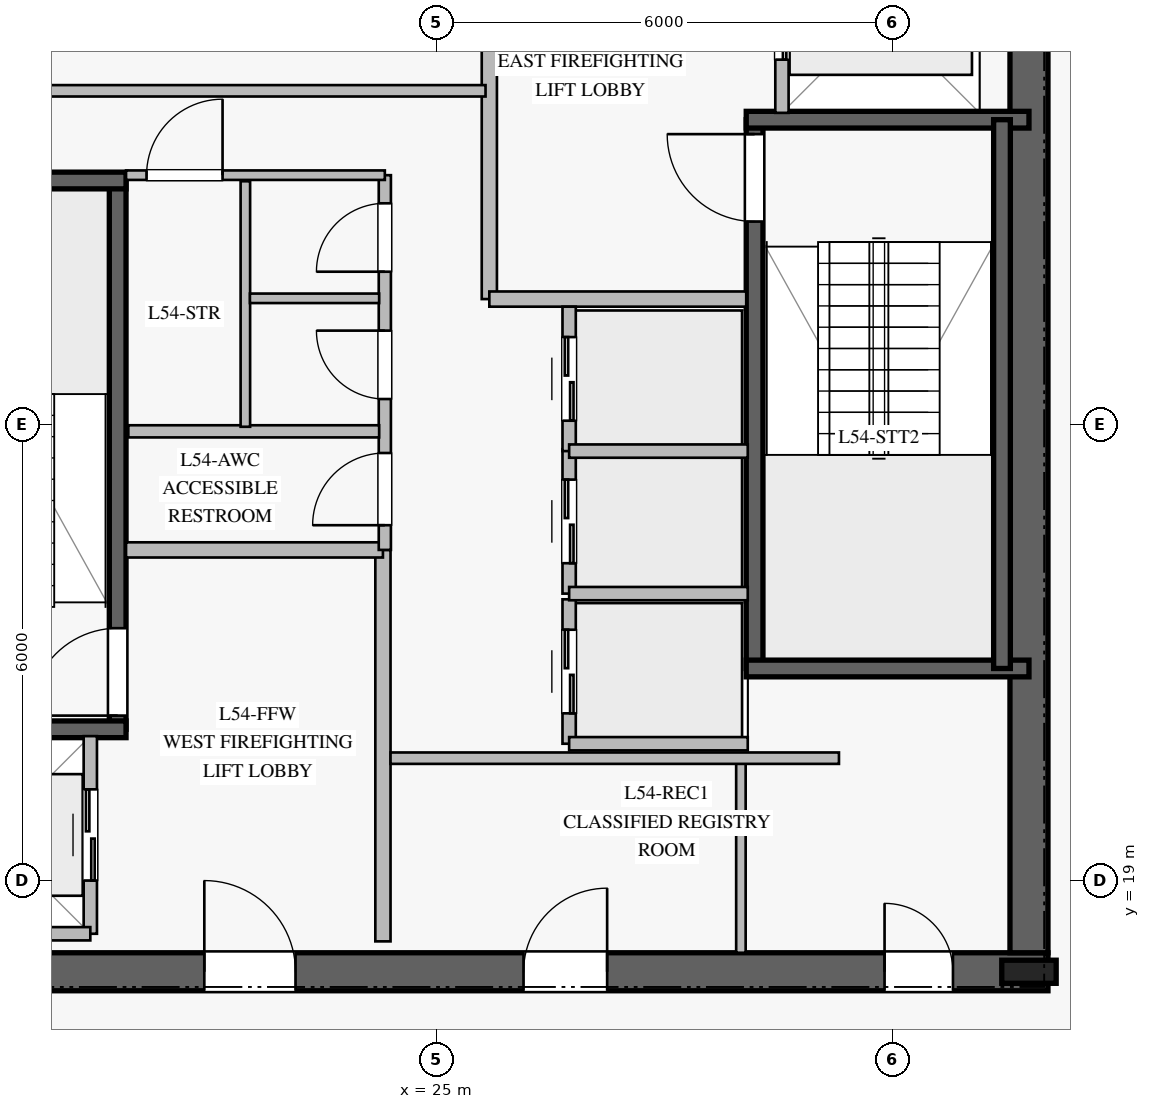
"""IFC4 building model, lengths in metres.
Left out: names, types, materials, properties, quantities, classifications, styles, units other than length and angle.
Written with IfcOpenShell. Run it as: python <this file> out.ifc"""

import sys

from ifc_helpers import new_model, si_unit, direction, frame, frame_2d, origin, origin_2d, place, context, subcontext, project, spatial, rectangle, i_section, extrude, element, fill, save


model = new_model("IFC4")
c1 = context("Model", 3, precision=1e-05, world=origin(), true_north=direction((0.0, 1.0)))
c2 = subcontext(c1, "Body", "Model", "MODEL_VIEW")
j1 = project(units=[si_unit("LENGTHUNIT", "METRE"), si_unit("PLANEANGLEUNIT", "RADIAN")], contexts=[c1])
p1 = place(None, origin())
s1 = spatial("IfcSite", under=j1, at=p1, CompositionType="ELEMENT")
p2 = place(p1, origin())
s2 = spatial("IfcBuilding", under=s1, at=p2, CompositionType="ELEMENT")
p3 = place(p2, frame((0.0, 0.0, 224.8)))
s3 = spatial("IfcBuildingStorey", under=s2, at=p3, CompositionType="ELEMENT", Elevation=224.8)
p4 = place(p3, frame((16.95, 17.8, 0.0), z_axis=(0.0, 0.0, 1.0), x_axis=(1.0, 0.0, 0.0)))
e1 = element("IfcWall", 1, at=p4, inside=s3, PredefinedType="SHEAR", context=c2, shape_type="SweptSolid", body=[
    extrude(rectangle(XDim=16.1, YDim=0.5, at=frame_2d((8.05, 0.0))), origin(), (0.0, 0.0, 1.0), 3.78),
])
p5 = place(p4, frame((5.0, 0.0, 0.0)))
e2 = element("IfcOpeningElement", 2, at=p5, cuts=e1, PredefinedType="OPENING", context=c2, shape_type="SweptSolid", body=[
    extrude(rectangle(XDim=1.2, YDim=2.25, at=frame_2d((0.6, 1.125))), frame((0.0, 0.26, 0.0), z_axis=(0.0, -1.0, 0.0), x_axis=(1.0, 0.0, 0.0)), (0.0, 0.0, 1.0), 0.52),
])
p6 = place(p4, frame((13.95, 0.0, 0.0)))
e3 = element("IfcOpeningElement", 3, at=p6, cuts=e1, PredefinedType="OPENING", context=c2, shape_type="SweptSolid", body=[
    extrude(rectangle(XDim=0.9, YDim=2.1, at=frame_2d((0.45, 1.05))), frame((0.0, 0.26, 0.0), z_axis=(0.0, -1.0, 0.0), x_axis=(1.0, 0.0, 0.0)), (0.0, 0.0, 1.0), 0.52),
])
p7 = place(p4, frame((9.2, 0.0, 0.0)))
e4 = element("IfcOpeningElement", 4, at=p7, cuts=e1, PredefinedType="OPENING", context=c2, shape_type="SweptSolid", body=[
    extrude(rectangle(XDim=1.1, YDim=2.2, at=frame_2d((0.55, 1.1))), frame((0.0, 0.26, 0.0), z_axis=(0.0, -1.0, 0.0), x_axis=(1.0, 0.0, 0.0)), (0.0, 0.0, 1.0), 0.52),
])
p8 = place(p3, frame((32.8, 18.05, 0.0), z_axis=(0.0, 0.0, 1.0), x_axis=(0.0, 1.0, 0.0)))
e5 = element("IfcWall", 5, at=p8, inside=s3, PredefinedType="SHEAR", context=c2, shape_type="SweptSolid", body=[
    extrude(rectangle(XDim=13.9, YDim=0.5, at=frame_2d((6.95, 0.0))), origin(), (0.0, 0.0, 1.0), 3.78),
])
p9 = place(p3, frame((32.8, 17.8, 0.0), z_axis=(0.0, 0.0, 1.0), x_axis=(1.0, 0.0, 0.0)))
e6 = element("IfcColumn", 6, at=p9, inside=s3, PredefinedType="COLUMN", context=c2, shape_type="SweptSolid", body=[
    extrude(i_section(OverallWidth=0.304, OverallDepth=0.716, WebThickness=0.021, FlangeThickness=0.04, at=origin_2d()), origin(), (0.0, 0.0, 1.0), 4.0),
])
p10 = place(p3, frame((20.81, 20.99, 0.0), z_axis=(0.0, 0.0, 1.0), x_axis=(0.0, 1.0, 0.0)))
e7 = element("IfcWall", 7, at=p10, inside=s3, PredefinedType="SOLIDWALL", context=c2, shape_type="SweptSolid", body=[
    extrude(rectangle(XDim=7.22, YDim=0.22, at=frame_2d((3.61, 0.0))), origin(), (0.0, 0.0, 1.0), 3.78),
])
p11 = place(p10, frame((0.18, 0.0, 0.0)))
e8 = element("IfcOpeningElement", 8, at=p11, cuts=e7, PredefinedType="OPENING", context=c2, shape_type="SweptSolid", body=[
    extrude(rectangle(XDim=1.15, YDim=2.2, at=frame_2d((0.575, 1.1))), frame((0.0, 0.12, 0.0), z_axis=(0.0, -1.0, 0.0), x_axis=(1.0, 0.0, 0.0)), (0.0, 0.0, 1.0), 0.24),
])
for number, where, z_axis, x_axis in (
    (9, (17.2, 20.99, 0.0), (0.0, 0.0, 1.0), (1.0, 0.0, 0.0)),
    (10, (17.2, 28.21, 0.0), (0.0, 0.0, 1.0), (1.0, 0.0, 0.0)),
):
    element("IfcWall", number, at=place(p3, frame(where, z_axis=z_axis, x_axis=x_axis)), inside=s3, PredefinedType="SOLIDWALL", context=c2, shape_type="SweptSolid", body=[
        extrude(rectangle(XDim=3.72, YDim=0.22, at=frame_2d((1.86, 0.0))), origin(), (0.0, 0.0, 1.0), 3.78),
    ])
p12 = place(p3, frame((29.19, 21.79, 0.0), z_axis=(0.0, 0.0, 1.0), x_axis=(0.0, 1.0, 0.0)))
e11 = element("IfcWall", 11, at=p12, inside=s3, PredefinedType="SOLIDWALL", context=c2, shape_type="SweptSolid", body=[
    extrude(rectangle(XDim=7.22, YDim=0.22, at=frame_2d((3.61, 0.0))), origin(), (0.0, 0.0, 1.0), 3.78),
])
p13 = place(p12, frame((5.88, 0.0, 0.0)))
e12 = element("IfcOpeningElement", 12, at=p13, cuts=e11, PredefinedType="OPENING", context=c2, shape_type="SweptSolid", body=[
    extrude(rectangle(XDim=1.15, YDim=2.2, at=frame_2d((0.575, 1.1))), frame((0.0, 0.12, 0.0), z_axis=(0.0, -1.0, 0.0), x_axis=(1.0, 0.0, 0.0)), (0.0, 0.0, 1.0), 0.24),
])
for number, where, z_axis, x_axis in (
    (13, (29.08, 21.79, 0.0), (0.0, 0.0, 1.0), (1.0, 0.0, 0.0)),
    (14, (29.08, 29.01, 0.0), (0.0, 0.0, 1.0), (1.0, 0.0, 0.0)),
):
    element("IfcWall", number, at=place(p3, frame(where, z_axis=z_axis, x_axis=x_axis)), inside=s3, PredefinedType="SOLIDWALL", context=c2, shape_type="SweptSolid", body=[
        extrude(rectangle(XDim=3.72, YDim=0.22, at=frame_2d((1.86, 0.0))), origin(), (0.0, 0.0, 1.0), 3.78),
    ])
p14 = place(p3, frame((32.445, 29.01, 0.0), z_axis=(0.0, 0.0, 1.0), x_axis=(0.0, -1.0, 0.0)))
e15 = element("IfcWall", 15, at=p14, inside=s3, PredefinedType="SOLIDWALL", context=c2, shape_type="SweptSolid", body=[
    extrude(rectangle(XDim=7.22, YDim=0.22, at=frame_2d((3.61, 0.0))), origin(), (0.0, 0.0, 1.0), 3.78),
])
p15 = place(p3, frame((24.3, 18.2, 0.0), z_axis=(0.0, 0.0, 1.0), x_axis=(0.0, 1.0, 0.0)))
e16 = element("IfcWall", 16, at=p15, inside=s3, PredefinedType="PARTITIONING", context=c2, shape_type="SweptSolid", body=[
    extrude(rectangle(XDim=5.15, YDim=0.2, at=frame_2d((2.575, 0.0))), origin(), (0.0, 0.0, 1.0), 3.78),
])
p16 = place(p3, frame((20.92, 23.35, 0.0), z_axis=(0.0, 0.0, 1.0), x_axis=(1.0, 0.0, 0.0)))
e17 = element("IfcWall", 17, at=p16, inside=s3, PredefinedType="PARTITIONING", context=c2, shape_type="SweptSolid", body=[
    extrude(rectangle(XDim=3.38, YDim=0.2, at=frame_2d((1.69, 0.0))), origin(), (0.0, 0.0, 1.0), 3.78),
])
p17 = place(p3, frame((25.7, 26.65, 0.0), z_axis=(0.0, 0.0, 1.0), x_axis=(0.0, 1.0, 0.0)))
e18 = element("IfcWall", 18, at=p17, inside=s3, PredefinedType="PARTITIONING", context=c2, shape_type="SweptSolid", body=[
    extrude(rectangle(XDim=5.15, YDim=0.2, at=frame_2d((2.575, 0.0))), origin(), (0.0, 0.0, 1.0), 3.78),
])
p18 = place(p3, frame((25.7, 26.65, 0.0), z_axis=(0.0, 0.0, 1.0), x_axis=(1.0, 0.0, 0.0)))
e19 = element("IfcWall", 19, at=p18, inside=s3, PredefinedType="PARTITIONING", context=c2, shape_type="SweptSolid", body=[
    extrude(rectangle(XDim=3.38, YDim=0.2, at=frame_2d((1.69, 0.0))), origin(), (0.0, 0.0, 1.0), 3.78),
])
p19 = place(p3, frame((24.325, 23.35, 0.0), z_axis=(0.0, 0.0, 1.0), x_axis=(0.0, 1.0, 0.0)))
e20 = element("IfcWall", 20, at=p19, inside=s3, PredefinedType="PLUMBINGWALL", context=c2, shape_type="SweptSolid", body=[
    extrude(rectangle(XDim=4.93, YDim=0.16, at=frame_2d((2.465, 0.0))), origin(), (0.0, 0.0, 1.0), 3.78),
])
p20 = place(p19, frame((0.325, 0.0, 0.0)))
e21 = element("IfcOpeningElement", 21, at=p20, cuts=e20, PredefinedType="OPENING", context=c2, shape_type="SweptSolid", body=[
    extrude(rectangle(XDim=0.95, YDim=2.1, at=frame_2d((0.475, 1.05))), frame((0.0, 0.09, 0.0), z_axis=(0.0, -1.0, 0.0), x_axis=(1.0, 0.0, 0.0)), (0.0, 0.0, 1.0), 0.18),
])
p21 = place(p19, frame((1.985, 0.0, 0.0)))
e22 = element("IfcOpeningElement", 22, at=p21, cuts=e20, PredefinedType="OPENING", context=c2, shape_type="SweptSolid", body=[
    extrude(rectangle(XDim=0.9, YDim=2.1, at=frame_2d((0.45, 1.05))), frame((0.0, 0.09, 0.0), z_axis=(0.0, -1.0, 0.0), x_axis=(1.0, 0.0, 0.0)), (0.0, 0.0, 1.0), 0.18),
])
p22 = place(p19, frame((3.66, 0.0, 0.0)))
e23 = element("IfcOpeningElement", 23, at=p22, cuts=e20, PredefinedType="OPENING", context=c2, shape_type="SweptSolid", body=[
    extrude(rectangle(XDim=0.9, YDim=2.1, at=frame_2d((0.45, 1.05))), frame((0.0, 0.09, 0.0), z_axis=(0.0, -1.0, 0.0), x_axis=(1.0, 0.0, 0.0)), (0.0, 0.0, 1.0), 0.18),
])
p23 = place(p3, frame((20.92, 28.28, 0.0), z_axis=(0.0, 0.0, 1.0), x_axis=(1.0, 0.0, 0.0)))
e24 = element("IfcWall", 24, at=p23, inside=s3, PredefinedType="PARTITIONING", context=c2, shape_type="SweptSolid", body=[
    extrude(rectangle(XDim=3.405, YDim=0.125, at=frame_2d((1.703, 0.0))), origin(), (0.0, 0.0, 1.0), 3.78),
])
p24 = place(p23, frame((0.27, 0.0, 0.0)))
e25 = element("IfcOpeningElement", 25, at=p24, cuts=e24, PredefinedType="OPENING", context=c2, shape_type="SweptSolid", body=[
    extrude(rectangle(XDim=1.0, YDim=2.15, at=frame_2d((0.5, 1.075))), frame((0.0, 0.073, 0.0), z_axis=(0.0, -1.0, 0.0), x_axis=(1.0, 0.0, 0.0)), (0.0, 0.0, 1.0), 0.145),
])
p25 = place(p3, frame((29.01, 18.05, 0.0), z_axis=(0.0, 0.0, 1.0), x_axis=(0.0, 1.0, 0.0)))
e26 = element("IfcWall", 26, at=p25, inside=s3, PredefinedType="PARTITIONING", context=c2, shape_type="SweptSolid", body=[
    extrude(rectangle(XDim=2.5, YDim=0.125, at=frame_2d((1.25, 0.0))), origin(), (0.0, 0.0, 1.0), 3.78),
])
p26 = place(p3, frame((20.95, 24.91, 0.0), z_axis=(0.0, 0.0, 1.0), x_axis=(1.0, 0.0, 0.0)))
e27 = element("IfcWall", 27, at=p26, inside=s3, PredefinedType="PLUMBINGWALL", context=c2, shape_type="SweptSolid", body=[
    extrude(rectangle(XDim=3.3, YDim=0.16, at=frame_2d((1.65, 0.0))), origin(), (0.0, 0.0, 1.0), 3.78),
])
p27 = place(p3, frame((22.49, 24.97, 0.0), z_axis=(0.0, 0.0, 1.0), x_axis=(0.0, 1.0, 0.0)))
e28 = element("IfcWall", 28, at=p27, inside=s3, PredefinedType="PARTITIONING", context=c2, shape_type="SweptSolid", body=[
    extrude(rectangle(XDim=3.23, YDim=0.125, at=frame_2d((1.615, 0.0))), origin(), (0.0, 0.0, 1.0), 3.78),
])
p28 = place(p3, frame((22.55, 26.66, 0.0), z_axis=(0.0, 0.0, 1.0), x_axis=(1.0, 0.0, 0.0)))
e29 = element("IfcWall", 29, at=p28, inside=s3, PredefinedType="PARTITIONING", context=c2, shape_type="SweptSolid", body=[
    extrude(rectangle(XDim=1.7, YDim=0.125, at=frame_2d((0.85, 0.0))), origin(), (0.0, 0.0, 1.0), 3.78),
])
p29 = place(p3, frame((24.4, 20.61, 0.0), z_axis=(0.0, 0.0, 1.0), x_axis=(1.0, 0.0, 0.0)))
e30 = element("IfcWall", 30, at=p29, inside=s3, PredefinedType="PARTITIONING", context=c2, shape_type="SweptSolid", body=[
    extrude(rectangle(XDim=5.9, YDim=0.15, at=frame_2d((2.95, 0.0))), origin(), (0.0, 0.0, 1.0), 3.78),
])
p30 = place(p3, frame((19.75, 29.39, 0.0), z_axis=(0.0, 0.0, 1.0), x_axis=(1.0, 0.0, 0.0)))
e31 = element("IfcWall", 31, at=p30, inside=s3, PredefinedType="PARTITIONING", context=c2, shape_type="SweptSolid", body=[
    extrude(rectangle(XDim=5.9, YDim=0.15, at=frame_2d((2.95, 0.0))), origin(), (0.0, 0.0, 1.0), 3.78),
])
p31 = place(p3, frame((26.75, 20.8, 0.0), z_axis=(0.0, 0.0, 1.0), x_axis=(0.0, 1.0, 0.0)))
e32 = element("IfcWall", 32, at=p31, inside=s3, PredefinedType="PARTITIONING", context=c2, shape_type="SweptSolid", body=[
    extrude(rectangle(XDim=1.9, YDim=0.175, at=frame_2d((0.95, 0.0))), origin(), (0.0, 0.0, 1.0), 3.78),
])
p32 = place(p31, frame((0.4, 0.0, 0.0)))
e33 = element("IfcOpeningElement", 33, at=p32, cuts=e32, PredefinedType="OPENING", context=c2, shape_type="SweptSolid", body=[
    extrude(rectangle(XDim=1.1, YDim=2.2, at=frame_2d((0.55, 1.1))), frame((0.0, 0.098, 0.0), z_axis=(0.0, -1.0, 0.0), x_axis=(1.0, 0.0, 0.0)), (0.0, 0.0, 1.0), 0.195),
])
p33 = place(p3, frame((26.75, 20.8, 0.0), z_axis=(0.0, 0.0, 1.0), x_axis=(1.0, 0.0, 0.0)))
e34 = element("IfcWall", 34, at=p33, inside=s3, PredefinedType="PARTITIONING", context=c2, shape_type="SweptSolid", body=[
    extrude(rectangle(XDim=2.35, YDim=0.175, at=frame_2d((1.175, 0.0))), origin(), (0.0, 0.0, 1.0), 3.78),
])
p34 = place(p3, frame((26.75, 22.775, 0.0), z_axis=(0.0, 0.0, 1.0), x_axis=(0.0, 1.0, 0.0)))
e35 = element("IfcWall", 35, at=p34, inside=s3, PredefinedType="PARTITIONING", context=c2, shape_type="SweptSolid", body=[
    extrude(rectangle(XDim=1.9, YDim=0.175, at=frame_2d((0.95, 0.0))), origin(), (0.0, 0.0, 1.0), 3.78),
])
p35 = place(p34, frame((0.4, 0.0, 0.0)))
e36 = element("IfcOpeningElement", 36, at=p35, cuts=e35, PredefinedType="OPENING", context=c2, shape_type="SweptSolid", body=[
    extrude(rectangle(XDim=1.1, YDim=2.2, at=frame_2d((0.55, 1.1))), frame((0.0, 0.098, 0.0), z_axis=(0.0, -1.0, 0.0), x_axis=(1.0, 0.0, 0.0)), (0.0, 0.0, 1.0), 0.195),
])
p36 = place(p3, frame((26.75, 22.775, 0.0), z_axis=(0.0, 0.0, 1.0), x_axis=(1.0, 0.0, 0.0)))
e37 = element("IfcWall", 37, at=p36, inside=s3, PredefinedType="PARTITIONING", context=c2, shape_type="SweptSolid", body=[
    extrude(rectangle(XDim=2.35, YDim=0.175, at=frame_2d((1.175, 0.0))), origin(), (0.0, 0.0, 1.0), 3.78),
])
p37 = place(p3, frame((26.75, 24.65, 0.0), z_axis=(0.0, 0.0, 1.0), x_axis=(0.0, 1.0, 0.0)))
e38 = element("IfcWall", 38, at=p37, inside=s3, PredefinedType="PARTITIONING", context=c2, shape_type="SweptSolid", body=[
    extrude(rectangle(XDim=1.9, YDim=0.175, at=frame_2d((0.95, 0.0))), origin(), (0.0, 0.0, 1.0), 3.78),
])
p38 = place(p37, frame((0.4, 0.0, 0.0)))
e39 = element("IfcOpeningElement", 39, at=p38, cuts=e38, PredefinedType="OPENING", context=c2, shape_type="SweptSolid", body=[
    extrude(rectangle(XDim=1.1, YDim=2.2, at=frame_2d((0.55, 1.1))), frame((0.0, 0.098, 0.0), z_axis=(0.0, -1.0, 0.0), x_axis=(1.0, 0.0, 0.0)), (0.0, 0.0, 1.0), 0.195),
])
p39 = place(p3, frame((26.75, 24.65, 0.0), z_axis=(0.0, 0.0, 1.0), x_axis=(1.0, 0.0, 0.0)))
e40 = element("IfcWall", 40, at=p39, inside=s3, PredefinedType="PARTITIONING", context=c2, shape_type="SweptSolid", body=[
    extrude(rectangle(XDim=2.35, YDim=0.175, at=frame_2d((1.175, 0.0))), origin(), (0.0, 0.0, 1.0), 3.78),
])
p40 = place(p3, frame((20.45, 18.3, 0.0), z_axis=(0.0, 0.0, 1.0), x_axis=(0.0, 1.0, 0.0)))
e41 = element("IfcWall", 41, at=p40, inside=s3, PredefinedType="PARTITIONING", context=c2, shape_type="SweptSolid", body=[
    extrude(rectangle(XDim=2.6, YDim=0.175, at=frame_2d((1.3, 0.0))), origin(), (0.0, 0.0, 1.0), 3.78),
])
p41 = place(p40, frame((0.7, 0.0, 0.0)))
e42 = element("IfcOpeningElement", 42, at=p41, cuts=e41, PredefinedType="OPENING", context=c2, shape_type="SweptSolid", body=[
    extrude(rectangle(XDim=1.2, YDim=2.2, at=frame_2d((0.6, 1.1))), frame((0.0, 0.098, 0.0), z_axis=(0.0, -1.0, 0.0), x_axis=(1.0, 0.0, 0.0)), (0.0, 0.0, 1.0), 0.195),
])
p42 = place(p3, frame((17.85, 18.3, 0.0), z_axis=(0.0, 0.0, 1.0), x_axis=(1.0, 0.0, 0.0)))
e43 = element("IfcWall", 43, at=p42, inside=s3, PredefinedType="PARTITIONING", context=c2, shape_type="SweptSolid", body=[
    extrude(rectangle(XDim=2.6, YDim=0.175, at=frame_2d((1.3, 0.0))), origin(), (0.0, 0.0, 1.0), 3.78),
])
p43 = place(p3, frame((29.55, 29.1, 0.0), z_axis=(0.0, 0.0, 1.0), x_axis=(0.0, 1.0, 0.0)))
e44 = element("IfcWall", 44, at=p43, inside=s3, PredefinedType="PARTITIONING", context=c2, shape_type="SweptSolid", body=[
    extrude(rectangle(XDim=2.6, YDim=0.175, at=frame_2d((1.3, 0.0))), origin(), (0.0, 0.0, 1.0), 3.78),
])
p44 = place(p43, frame((0.7, 0.0, 0.0)))
e45 = element("IfcOpeningElement", 45, at=p44, cuts=e44, PredefinedType="OPENING", context=c2, shape_type="SweptSolid", body=[
    extrude(rectangle(XDim=1.2, YDim=2.2, at=frame_2d((0.6, 1.1))), frame((0.0, 0.098, 0.0), z_axis=(0.0, -1.0, 0.0), x_axis=(1.0, 0.0, 0.0)), (0.0, 0.0, 1.0), 0.195),
])
p45 = place(p11, origin())
e46 = element("IfcDoor", 46, at=p45, inside=s3, OperationType="SINGLE_SWING_LEFT", PredefinedType="DOOR", context=c2, shape_type="SweptSolid", body=[
    extrude(rectangle(XDim=1.15, YDim=2.2, at=frame_2d((0.575, 1.1))), frame((0.0, 0.025, 0.0), z_axis=(0.0, -1.0, 0.0), x_axis=(1.0, 0.0, 0.0)), (0.0, 0.0, 1.0), 0.05),
])
fill(e8, e46)
p46 = place(p13, origin())
e47 = element("IfcDoor", 47, at=p46, inside=s3, OperationType="SINGLE_SWING_RIGHT", PredefinedType="DOOR", context=c2, shape_type="SweptSolid", body=[
    extrude(rectangle(XDim=1.15, YDim=2.2, at=frame_2d((0.575, 1.1))), frame((0.0, 0.025, 0.0), z_axis=(0.0, -1.0, 0.0), x_axis=(1.0, 0.0, 0.0)), (0.0, 0.0, 1.0), 0.05),
])
fill(e12, e47)
p47 = place(p5, origin())
e48 = element("IfcDoor", 48, at=p47, inside=s3, OperationType="SINGLE_SWING_LEFT", PredefinedType="DOOR", context=c2, shape_type="SweptSolid", body=[
    extrude(rectangle(XDim=1.2, YDim=2.25, at=frame_2d((0.6, 1.125))), frame((0.0, 0.025, 0.0), z_axis=(0.0, -1.0, 0.0), x_axis=(1.0, 0.0, 0.0)), (0.0, 0.0, 1.0), 0.05),
])
fill(e2, e48)
p48 = place(p20, origin())
e49 = element("IfcDoor", 49, at=p48, inside=s3, OperationType="SINGLE_SWING_LEFT", PredefinedType="DOOR", context=c2, shape_type="SweptSolid", body=[
    extrude(rectangle(XDim=0.95, YDim=2.1, at=frame_2d((0.475, 1.05))), frame((0.0, 0.025, 0.0), z_axis=(0.0, -1.0, 0.0), x_axis=(1.0, 0.0, 0.0)), (0.0, 0.0, 1.0), 0.05),
])
fill(e21, e49)
p49 = place(p21, origin())
e50 = element("IfcDoor", 50, at=p49, inside=s3, OperationType="SINGLE_SWING_RIGHT", PredefinedType="DOOR", context=c2, shape_type="SweptSolid", body=[
    extrude(rectangle(XDim=0.9, YDim=2.1, at=frame_2d((0.45, 1.05))), frame((0.0, 0.025, 0.0), z_axis=(0.0, -1.0, 0.0), x_axis=(1.0, 0.0, 0.0)), (0.0, 0.0, 1.0), 0.05),
])
fill(e22, e50)
p50 = place(p22, origin())
e51 = element("IfcDoor", 51, at=p50, inside=s3, OperationType="SINGLE_SWING_LEFT", PredefinedType="DOOR", context=c2, shape_type="SweptSolid", body=[
    extrude(rectangle(XDim=0.9, YDim=2.1, at=frame_2d((0.45, 1.05))), frame((0.0, 0.025, 0.0), z_axis=(0.0, -1.0, 0.0), x_axis=(1.0, 0.0, 0.0)), (0.0, 0.0, 1.0), 0.05),
])
fill(e23, e51)
p51 = place(p24, origin())
e52 = element("IfcDoor", 52, at=p51, inside=s3, OperationType="SINGLE_SWING_RIGHT", PredefinedType="DOOR", context=c2, shape_type="SweptSolid", body=[
    extrude(rectangle(XDim=1.0, YDim=2.15, at=frame_2d((0.5, 1.075))), frame((0.0, 0.025, 0.0), z_axis=(0.0, -1.0, 0.0), x_axis=(1.0, 0.0, 0.0)), (0.0, 0.0, 1.0), 0.05),
])
fill(e25, e52)
p52 = place(p6, origin())
e53 = element("IfcDoor", 53, at=p52, inside=s3, OperationType="SINGLE_SWING_LEFT", PredefinedType="DOOR", context=c2, shape_type="SweptSolid", body=[
    extrude(rectangle(XDim=0.9, YDim=2.1, at=frame_2d((0.45, 1.05))), frame((0.0, 0.025, 0.0), z_axis=(0.0, -1.0, 0.0), x_axis=(1.0, 0.0, 0.0)), (0.0, 0.0, 1.0), 0.05),
])
fill(e3, e53)
p53 = place(p7, origin())
e54 = element("IfcDoor", 54, at=p53, inside=s3, OperationType="SINGLE_SWING_RIGHT", PredefinedType="DOOR", context=c2, shape_type="SweptSolid", body=[
    extrude(rectangle(XDim=1.1, YDim=2.2, at=frame_2d((0.55, 1.1))), frame((0.0, 0.025, 0.0), z_axis=(0.0, -1.0, 0.0), x_axis=(1.0, 0.0, 0.0)), (0.0, 0.0, 1.0), 0.05),
])
fill(e4, e54)
p54 = place(p32, origin())
e55 = element("IfcDoor", 55, at=p54, inside=s3, OperationType="DOUBLE_DOOR_SLIDING", PredefinedType="DOOR", context=c2, shape_type="SweptSolid", body=[
    extrude(rectangle(XDim=1.1, YDim=2.2, at=frame_2d((0.55, 1.1))), frame((0.0, 0.025, 0.0), z_axis=(0.0, -1.0, 0.0), x_axis=(1.0, 0.0, 0.0)), (0.0, 0.0, 1.0), 0.05),
])
fill(e33, e55)
p55 = place(p35, origin())
e56 = element("IfcDoor", 56, at=p55, inside=s3, OperationType="DOUBLE_DOOR_SLIDING", PredefinedType="DOOR", context=c2, shape_type="SweptSolid", body=[
    extrude(rectangle(XDim=1.1, YDim=2.2, at=frame_2d((0.55, 1.1))), frame((0.0, 0.025, 0.0), z_axis=(0.0, -1.0, 0.0), x_axis=(1.0, 0.0, 0.0)), (0.0, 0.0, 1.0), 0.05),
])
fill(e36, e56)
p56 = place(p38, origin())
e57 = element("IfcDoor", 57, at=p56, inside=s3, OperationType="DOUBLE_DOOR_SLIDING", PredefinedType="DOOR", context=c2, shape_type="SweptSolid", body=[
    extrude(rectangle(XDim=1.1, YDim=2.2, at=frame_2d((0.55, 1.1))), frame((0.0, 0.025, 0.0), z_axis=(0.0, -1.0, 0.0), x_axis=(1.0, 0.0, 0.0)), (0.0, 0.0, 1.0), 0.05),
])
fill(e39, e57)
p57 = place(p41, origin())
e58 = element("IfcDoor", 58, at=p57, inside=s3, OperationType="DOUBLE_DOOR_SLIDING", PredefinedType="DOOR", context=c2, shape_type="SweptSolid", body=[
    extrude(rectangle(XDim=1.2, YDim=2.2, at=frame_2d((0.6, 1.1))), frame((0.0, 0.025, 0.0), z_axis=(0.0, -1.0, 0.0), x_axis=(1.0, 0.0, 0.0)), (0.0, 0.0, 1.0), 0.05),
])
fill(e42, e58)
p58 = place(p44, origin())
e59 = element("IfcDoor", 59, at=p58, inside=s3, OperationType="DOUBLE_DOOR_SLIDING", PredefinedType="DOOR", context=c2, shape_type="SweptSolid", body=[
    extrude(rectangle(XDim=1.2, YDim=2.2, at=frame_2d((0.6, 1.1))), frame((0.0, 0.025, 0.0), z_axis=(0.0, -1.0, 0.0), x_axis=(1.0, 0.0, 0.0)), (0.0, 0.0, 1.0), 0.05),
])
fill(e45, e59)
save(model, sys.argv[1])
